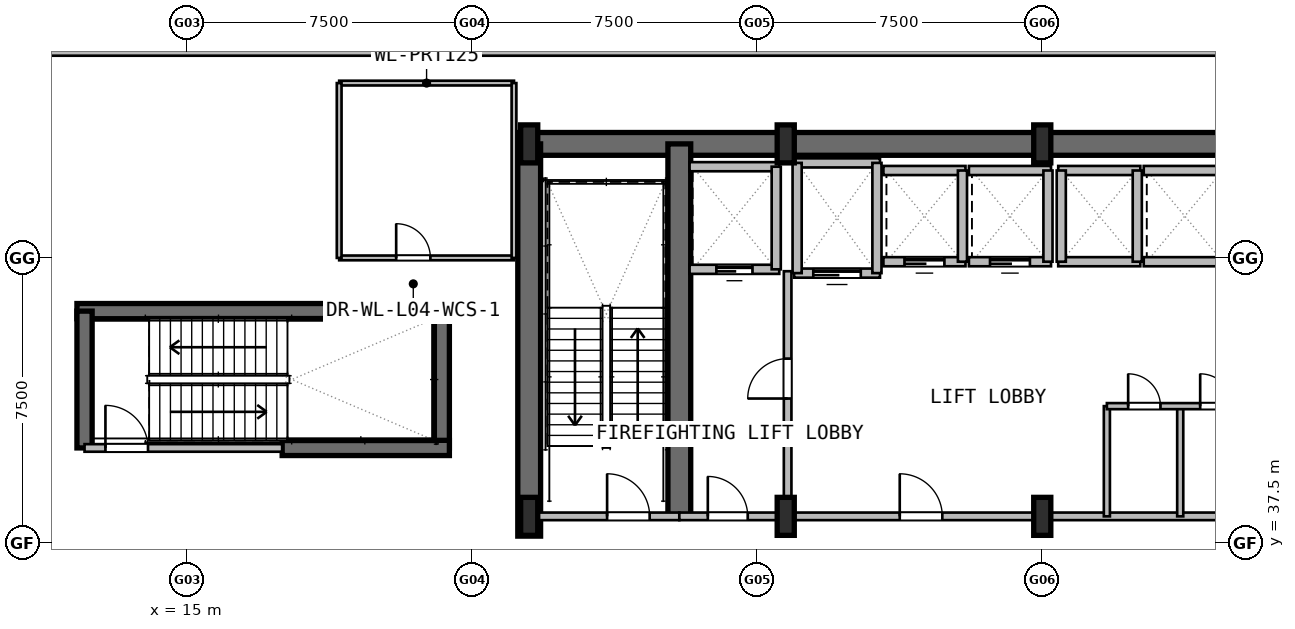
"""IFC4 building model, lengths in metres.
Left out: names, types, materials, properties, quantities, classifications, styles, units other than length and angle.
Written with IfcOpenShell. Run it as: python <this file> out.ifc"""

import sys

from ifc_helpers import new_model, si_unit, direction, frame, frame_2d, origin, origin_2d, place, context, subcontext, project, spatial, rectangle, i_section, extrude, element, fill, save


model = new_model("IFC4")
c1 = context("Model", 3, precision=1e-05, world=origin(), true_north=direction((0.0, 1.0)))
c2 = subcontext(c1, "Body", "Model", "MODEL_VIEW")
j1 = project(units=[si_unit("LENGTHUNIT", "METRE"), si_unit("PLANEANGLEUNIT", "RADIAN")], contexts=[c1])
p1 = place(None, origin())
s1 = spatial("IfcSite", under=j1, at=p1, CompositionType="ELEMENT")
p2 = place(p1, origin())
s2 = spatial("IfcBuilding", under=s1, at=p2, CompositionType="ELEMENT")
p3 = place(p2, frame((0.0, 0.0, 20.4)))
s3 = spatial("IfcBuildingStorey", under=s2, at=p3, CompositionType="ELEMENT", Elevation=20.4)
p4 = place(p3, frame((23.7, 48.0, 0.0), z_axis=(0.0, 0.0, 1.0), x_axis=(1.0, 0.0, 0.0)))
e1 = element("IfcWall", 1, at=p4, inside=s3, PredefinedType="SHEAR", context=c2, shape_type="SweptSolid", body=[
    extrude(rectangle(XDim=27.6, YDim=0.6, at=frame_2d((13.8, 0.0))), origin(), (0.0, 0.0, 1.0), 4.8),
])
p5 = place(p3, frame((24.0, 37.68, 0.0), z_axis=(0.0, 0.0, 1.0), x_axis=(0.0, 1.0, 0.0)))
e2 = element("IfcWall", 2, at=p5, inside=s3, PredefinedType="SHEAR", context=c2, shape_type="SweptSolid", body=[
    extrude(rectangle(XDim=10.32, YDim=0.6, at=frame_2d((5.16, 0.0))), origin(), (0.0, 0.0, 1.0), 4.8),
])
p6 = place(p3, frame((27.95, 38.2, 0.0), z_axis=(0.0, 0.0, 1.0), x_axis=(0.0, 1.0, 0.0)))
e3 = element("IfcWall", 3, at=p6, inside=s3, PredefinedType="SHEAR", context=c2, shape_type="SweptSolid", body=[
    extrude(rectangle(XDim=9.8, YDim=0.6, at=frame_2d((4.9, 0.0))), origin(), (0.0, 0.0, 1.0), 4.8),
])
for number, where, z_axis, x_axis in (
    (4, (24.0, 38.2, 0.0), (0.0, 0.0, 1.0), (1.0, 0.0, 0.0)),
    (5, (24.0, 48.0, 0.0), (0.0, 0.0, 1.0), (1.0, 0.0, 0.0)),
    (6, (30.75, 38.2, 0.0), (0.0, 0.0, 1.0), (1.0, 0.0, 0.0)),
    (7, (30.75, 48.0, 0.0), (0.0, 0.0, 1.0), (1.0, 0.0, 0.0)),
    (8, (37.5, 38.2, 0.0), (0.0, 0.0, 1.0), (1.0, 0.0, 0.0)),
    (9, (37.5, 48.0, 0.0), (0.0, 0.0, 1.0), (1.0, 0.0, 0.0)),
):
    element("IfcColumn", number, at=place(p3, frame(where, z_axis=z_axis, x_axis=x_axis)), inside=s3, PredefinedType="COLUMN", context=c2, shape_type="SweptSolid", body=[
        extrude(i_section(OverallWidth=0.45, OverallDepth=1.0, WebThickness=0.022, FlangeThickness=0.04, at=origin_2d()), origin(), (0.0, 0.0, 1.0), 4.8),
    ])
p7 = place(p3, frame((12.1, 43.6, 0.0), z_axis=(0.0, 0.0, 1.0), x_axis=(1.0, 0.0, 0.0)))
e10 = element("IfcWall", 10, at=p7, inside=s3, PredefinedType="SHEAR", context=c2, shape_type="SweptSolid", body=[
    extrude(rectangle(XDim=9.8, YDim=0.4, at=frame_2d((4.9, 0.0))), origin(), (0.0, 0.0, 1.0), 4.8),
])
for number, where, z_axis, x_axis in (
    (11, (12.3, 40.0, 0.0), (0.0, 0.0, 1.0), (0.0, 1.0, 0.0)),
    (12, (21.7, 40.0, 0.0), (0.0, 0.0, 1.0), (0.0, 1.0, 0.0)),
):
    element("IfcWall", number, at=place(p3, frame(where, z_axis=z_axis, x_axis=x_axis)), inside=s3, PredefinedType="SHEAR", context=c2, shape_type="SweptSolid", body=[
        extrude(rectangle(XDim=3.6, YDim=0.4, at=frame_2d((1.8, 0.0))), origin(), (0.0, 0.0, 1.0), 4.8),
    ])
p8 = place(p3, frame((17.5, 40.0, 0.0), z_axis=(0.0, 0.0, 1.0), x_axis=(1.0, 0.0, 0.0)))
e13 = element("IfcWall", 13, at=p8, inside=s3, PredefinedType="SHEAR", context=c2, shape_type="SweptSolid", body=[
    extrude(rectangle(XDim=4.4, YDim=0.4, at=frame_2d((2.2, 0.0))), origin(), (0.0, 0.0, 1.0), 4.8),
])
p9 = place(p3, frame((7.32, 50.5, 0.0), z_axis=(0.0, 0.0, 1.0), x_axis=(1.0, 0.0, 0.0)))
e14 = element("IfcWall", 14, at=p9, inside=s3, PredefinedType="SOLIDWALL", context=c2, shape_type="SweptSolid", body=[
    extrude(rectangle(XDim=88.53, YDim=0.36, at=frame_2d((44.265, 0.0))), origin(), (0.0, 0.0, 1.0), 4.43),
])
p10 = place(p3, frame((24.0, 38.2, 0.0), z_axis=(0.0, 0.0, 1.0), x_axis=(1.0, 0.0, 0.0)))
e15 = element("IfcWall", 15, at=p10, inside=s3, PredefinedType="PARTITIONING", context=c2, shape_type="SweptSolid", body=[
    extrude(rectangle(XDim=3.95, YDim=0.2, at=frame_2d((1.975, 0.0))), origin(), (0.0, 0.0, 1.0), 3.63),
])
p11 = place(p10, frame((2.05, 0.0, 0.0)))
e16 = element("IfcOpeningElement", 16, at=p11, cuts=e15, PredefinedType="OPENING", context=c2, shape_type="SweptSolid", body=[
    extrude(rectangle(XDim=1.12, YDim=2.1, at=frame_2d((0.56, 1.05))), frame((0.0, 0.11, 0.0), z_axis=(0.0, -1.0, 0.0), x_axis=(1.0, 0.0, 0.0)), (0.0, 0.0, 1.0), 0.22),
])
p12 = place(p3, frame((30.8, 38.2, 0.0), z_axis=(0.0, 0.0, 1.0), x_axis=(0.0, 1.0, 0.0)))
e17 = element("IfcWall", 17, at=p12, inside=s3, PredefinedType="PARTITIONING", context=c2, shape_type="SweptSolid", body=[
    extrude(rectangle(XDim=6.45, YDim=0.2, at=frame_2d((3.225, 0.0))), origin(), (0.0, 0.0, 1.0), 3.63),
])
p13 = place(p12, frame((3.1, 0.0, 0.0)))
e18 = element("IfcOpeningElement", 18, at=p13, cuts=e17, PredefinedType="OPENING", context=c2, shape_type="SweptSolid", body=[
    extrude(rectangle(XDim=1.05, YDim=2.1, at=frame_2d((0.525, 1.05))), frame((0.0, 0.11, 0.0), z_axis=(0.0, -1.0, 0.0), x_axis=(1.0, 0.0, 0.0)), (0.0, 0.0, 1.0), 0.22),
])
p14 = place(p3, frame((27.95, 38.2, 0.0), z_axis=(0.0, 0.0, 1.0), x_axis=(1.0, 0.0, 0.0)))
e19 = element("IfcWall", 19, at=p14, inside=s3, PredefinedType="PARTITIONING", context=c2, shape_type="SweptSolid", body=[
    extrude(rectangle(XDim=2.85, YDim=0.2, at=frame_2d((1.425, 0.0))), origin(), (0.0, 0.0, 1.0), 3.63),
])
p15 = place(p14, frame((0.75, 0.0, 0.0)))
e20 = element("IfcOpeningElement", 20, at=p15, cuts=e19, PredefinedType="OPENING", context=c2, shape_type="SweptSolid", body=[
    extrude(rectangle(XDim=1.05, YDim=2.1, at=frame_2d((0.525, 1.05))), frame((0.0, 0.11, 0.0), z_axis=(0.0, -1.0, 0.0), x_axis=(1.0, 0.0, 0.0)), (0.0, 0.0, 1.0), 0.22),
])
p16 = place(p3, frame((30.8, 38.2, 0.0), z_axis=(0.0, 0.0, 1.0), x_axis=(1.0, 0.0, 0.0)))
e21 = element("IfcWall", 21, at=p16, inside=s3, PredefinedType="PARTITIONING", context=c2, shape_type="SweptSolid", body=[
    extrude(rectangle(XDim=16.35, YDim=0.2, at=frame_2d((8.175, 0.0))), origin(), (0.0, 0.0, 1.0), 3.63),
])
p17 = place(p16, frame((2.95, 0.0, 0.0)))
e22 = element("IfcOpeningElement", 22, at=p17, cuts=e21, PredefinedType="OPENING", context=c2, shape_type="SweptSolid", body=[
    extrude(rectangle(XDim=1.12, YDim=2.1, at=frame_2d((0.56, 1.05))), frame((0.0, 0.11, 0.0), z_axis=(0.0, -1.0, 0.0), x_axis=(1.0, 0.0, 0.0)), (0.0, 0.0, 1.0), 0.22),
])
p18 = place(p3, frame((28.22, 44.7, 0.0), z_axis=(0.0, 0.0, 1.0), x_axis=(1.0, 0.0, 0.0)))
e23 = element("IfcWall", 23, at=p18, inside=s3, PredefinedType="PARTITIONING", context=c2, shape_type="SweptSolid", body=[
    extrude(rectangle(XDim=2.36, YDim=0.24, at=frame_2d((1.18, 0.0))), origin(), (0.0, 0.0, 1.0), 4.43),
])
p19 = place(p18, frame((0.705, 0.0, 0.0)))
e24 = element("IfcOpeningElement", 24, at=p19, cuts=e23, PredefinedType="OPENING", context=c2, shape_type="SweptSolid", body=[
    extrude(rectangle(XDim=0.95, YDim=2.15, at=frame_2d((0.475, 1.075))), frame((0.0, 0.13, 0.0), z_axis=(0.0, -1.0, 0.0), x_axis=(1.0, 0.0, 0.0)), (0.0, 0.0, 1.0), 0.26),
])
p20 = place(p3, frame((28.22, 47.4, 0.0), z_axis=(0.0, 0.0, 1.0), x_axis=(1.0, 0.0, 0.0)))
e25 = element("IfcWall", 25, at=p20, inside=s3, PredefinedType="PARTITIONING", context=c2, shape_type="SweptSolid", body=[
    extrude(rectangle(XDim=2.36, YDim=0.24, at=frame_2d((1.18, 0.0))), origin(), (0.0, 0.0, 1.0), 4.43),
])
p21 = place(p3, frame((30.5, 44.7, 0.0), z_axis=(0.0, 0.0, 1.0), x_axis=(0.0, 1.0, 0.0)))
e26 = element("IfcWall", 26, at=p21, inside=s3, PredefinedType="PARTITIONING", context=c2, shape_type="SweptSolid", body=[
    extrude(rectangle(XDim=2.7, YDim=0.24, at=frame_2d((1.35, 0.0))), origin(), (0.0, 0.0, 1.0), 3.63),
])
p22 = place(p3, frame((30.97, 44.6, 0.0), z_axis=(0.0, 0.0, 1.0), x_axis=(1.0, 0.0, 0.0)))
e27 = element("IfcWall", 27, at=p22, inside=s3, PredefinedType="PARTITIONING", context=c2, shape_type="SweptSolid", body=[
    extrude(rectangle(XDim=2.26, YDim=0.24, at=frame_2d((1.13, 0.0))), origin(), (0.0, 0.0, 1.0), 4.43),
])
p23 = place(p22, frame((0.505, 0.0, 0.0)))
e28 = element("IfcOpeningElement", 28, at=p23, cuts=e27, PredefinedType="OPENING", context=c2, shape_type="SweptSolid", body=[
    extrude(rectangle(XDim=1.25, YDim=2.2, at=frame_2d((0.625, 1.1))), frame((0.0, 0.13, 0.0), z_axis=(0.0, -1.0, 0.0), x_axis=(1.0, 0.0, 0.0)), (0.0, 0.0, 1.0), 0.26),
])
p24 = place(p3, frame((30.97, 47.5, 0.0), z_axis=(0.0, 0.0, 1.0), x_axis=(1.0, 0.0, 0.0)))
e29 = element("IfcWall", 29, at=p24, inside=s3, PredefinedType="PARTITIONING", context=c2, shape_type="SweptSolid", body=[
    extrude(rectangle(XDim=2.26, YDim=0.24, at=frame_2d((1.13, 0.0))), origin(), (0.0, 0.0, 1.0), 4.43),
])
p25 = place(p3, frame((31.05, 44.6, 0.0), z_axis=(0.0, 0.0, 1.0), x_axis=(0.0, 1.0, 0.0)))
e30 = element("IfcWall", 30, at=p25, inside=s3, PredefinedType="PARTITIONING", context=c2, shape_type="SweptSolid", body=[
    extrude(rectangle(XDim=2.9, YDim=0.24, at=frame_2d((1.45, 0.0))), origin(), (0.0, 0.0, 1.0), 3.63),
])
p26 = place(p3, frame((33.15, 44.6, 0.0), z_axis=(0.0, 0.0, 1.0), x_axis=(0.0, 1.0, 0.0)))
e31 = element("IfcWall", 31, at=p26, inside=s3, PredefinedType="PARTITIONING", context=c2, shape_type="SweptSolid", body=[
    extrude(rectangle(XDim=2.9, YDim=0.24, at=frame_2d((1.45, 0.0))), origin(), (0.0, 0.0, 1.0), 4.43),
])
p27 = place(p3, frame((33.32, 44.9, 0.0), z_axis=(0.0, 0.0, 1.0), x_axis=(1.0, 0.0, 0.0)))
e32 = element("IfcWall", 32, at=p27, inside=s3, PredefinedType="PARTITIONING", context=c2, shape_type="SweptSolid", body=[
    extrude(rectangle(XDim=2.16, YDim=0.24, at=frame_2d((1.08, 0.0))), origin(), (0.0, 0.0, 1.0), 4.43),
])
p28 = place(p27, frame((0.555, 0.0, 0.0)))
e33 = element("IfcOpeningElement", 33, at=p28, cuts=e32, PredefinedType="OPENING", context=c2, shape_type="SweptSolid", body=[
    extrude(rectangle(XDim=1.05, YDim=2.15, at=frame_2d((0.525, 1.075))), frame((0.0, 0.13, 0.0), z_axis=(0.0, -1.0, 0.0), x_axis=(1.0, 0.0, 0.0)), (0.0, 0.0, 1.0), 0.26),
])
p29 = place(p3, frame((33.32, 47.3, 0.0), z_axis=(0.0, 0.0, 1.0), x_axis=(1.0, 0.0, 0.0)))
e34 = element("IfcWall", 34, at=p29, inside=s3, PredefinedType="PARTITIONING", context=c2, shape_type="SweptSolid", body=[
    extrude(rectangle(XDim=2.16, YDim=0.24, at=frame_2d((1.08, 0.0))), origin(), (0.0, 0.0, 1.0), 4.43),
])
p30 = place(p3, frame((35.4, 44.9, 0.0), z_axis=(0.0, 0.0, 1.0), x_axis=(0.0, 1.0, 0.0)))
e35 = element("IfcWall", 35, at=p30, inside=s3, PredefinedType="PARTITIONING", context=c2, shape_type="SweptSolid", body=[
    extrude(rectangle(XDim=2.4, YDim=0.24, at=frame_2d((1.2, 0.0))), origin(), (0.0, 0.0, 1.0), 4.43),
])
p31 = place(p3, frame((35.57, 44.9, 0.0), z_axis=(0.0, 0.0, 1.0), x_axis=(1.0, 0.0, 0.0)))
e36 = element("IfcWall", 36, at=p31, inside=s3, PredefinedType="PARTITIONING", context=c2, shape_type="SweptSolid", body=[
    extrude(rectangle(XDim=2.16, YDim=0.24, at=frame_2d((1.08, 0.0))), origin(), (0.0, 0.0, 1.0), 4.43),
])
p32 = place(p31, frame((0.555, 0.0, 0.0)))
e37 = element("IfcOpeningElement", 37, at=p32, cuts=e36, PredefinedType="OPENING", context=c2, shape_type="SweptSolid", body=[
    extrude(rectangle(XDim=1.05, YDim=2.15, at=frame_2d((0.525, 1.075))), frame((0.0, 0.13, 0.0), z_axis=(0.0, -1.0, 0.0), x_axis=(1.0, 0.0, 0.0)), (0.0, 0.0, 1.0), 0.26),
])
p33 = place(p3, frame((35.57, 47.3, 0.0), z_axis=(0.0, 0.0, 1.0), x_axis=(1.0, 0.0, 0.0)))
e38 = element("IfcWall", 38, at=p33, inside=s3, PredefinedType="PARTITIONING", context=c2, shape_type="SweptSolid", body=[
    extrude(rectangle(XDim=2.16, YDim=0.24, at=frame_2d((1.08, 0.0))), origin(), (0.0, 0.0, 1.0), 4.43),
])
p34 = place(p3, frame((37.65, 44.9, 0.0), z_axis=(0.0, 0.0, 1.0), x_axis=(0.0, 1.0, 0.0)))
e39 = element("IfcWall", 39, at=p34, inside=s3, PredefinedType="PARTITIONING", context=c2, shape_type="SweptSolid", body=[
    extrude(rectangle(XDim=2.4, YDim=0.24, at=frame_2d((1.2, 0.0))), origin(), (0.0, 0.0, 1.0), 4.43),
])
for number, where, z_axis, x_axis in (
    (40, (37.92, 44.9, 0.0), (0.0, 0.0, 1.0), (1.0, 0.0, 0.0)),
    (41, (37.92, 47.3, 0.0), (0.0, 0.0, 1.0), (1.0, 0.0, 0.0)),
):
    element("IfcWall", number, at=place(p3, frame(where, z_axis=z_axis, x_axis=x_axis)), inside=s3, PredefinedType="PARTITIONING", context=c2, shape_type="SweptSolid", body=[
        extrude(rectangle(XDim=2.16, YDim=0.24, at=frame_2d((1.08, 0.0))), origin(), (0.0, 0.0, 1.0), 4.43),
    ])
for number, where, z_axis, x_axis in (
    (42, (38.0, 44.9, 0.0), (0.0, 0.0, 1.0), (0.0, 1.0, 0.0)),
    (43, (40.0, 44.9, 0.0), (0.0, 0.0, 1.0), (0.0, 1.0, 0.0)),
):
    element("IfcWall", number, at=place(p3, frame(where, z_axis=z_axis, x_axis=x_axis)), inside=s3, PredefinedType="PARTITIONING", context=c2, shape_type="SweptSolid", body=[
        extrude(rectangle(XDim=2.4, YDim=0.24, at=frame_2d((1.2, 0.0))), origin(), (0.0, 0.0, 1.0), 4.43),
    ])
for number, where, z_axis, x_axis in (
    (44, (40.17, 44.9, 0.0), (0.0, 0.0, 1.0), (1.0, 0.0, 0.0)),
    (45, (40.17, 47.3, 0.0), (0.0, 0.0, 1.0), (1.0, 0.0, 0.0)),
):
    element("IfcWall", number, at=place(p3, frame(where, z_axis=z_axis, x_axis=x_axis)), inside=s3, PredefinedType="PARTITIONING", context=c2, shape_type="SweptSolid", body=[
        extrude(rectangle(XDim=2.16, YDim=0.24, at=frame_2d((1.08, 0.0))), origin(), (0.0, 0.0, 1.0), 4.43),
    ])
p35 = place(p3, frame((12.3, 40.0, 0.0), z_axis=(0.0, 0.0, 1.0), x_axis=(1.0, 0.0, 0.0)))
e46 = element("IfcWall", 46, at=p35, inside=s3, PredefinedType="PARTITIONING", context=c2, shape_type="SweptSolid", body=[
    extrude(rectangle(XDim=5.2, YDim=0.2, at=frame_2d((2.6, 0.0))), origin(), (0.0, 0.0, 1.0), 4.43),
])
p36 = place(p35, frame((0.55, 0.0, 0.0)))
e47 = element("IfcOpeningElement", 47, at=p36, cuts=e46, PredefinedType="OPENING", context=c2, shape_type="SweptSolid", body=[
    extrude(rectangle(XDim=1.12, YDim=2.1, at=frame_2d((0.56, 1.05))), frame((0.0, 0.11, 0.0), z_axis=(0.0, -1.0, 0.0), x_axis=(1.0, 0.0, 0.0)), (0.0, 0.0, 1.0), 0.22),
])
p37 = place(p3, frame((19.0, 45.0, 0.0), z_axis=(0.0, 0.0, 1.0), x_axis=(1.0, 0.0, 0.0)))
e48 = element("IfcWall", 48, at=p37, inside=s3, PredefinedType="PARTITIONING", context=c2, shape_type="SweptSolid", body=[
    extrude(rectangle(XDim=4.6, YDim=0.125, at=frame_2d((2.3, 0.0))), origin(), (0.0, 0.0, 1.0), 4.43),
])
p38 = place(p37, frame((1.5, 0.0, 0.0)))
e49 = element("IfcOpeningElement", 49, at=p38, cuts=e48, PredefinedType="OPENING", context=c2, shape_type="SweptSolid", body=[
    extrude(rectangle(XDim=0.9, YDim=2.05, at=frame_2d((0.45, 1.025))), frame((0.0, 0.073, 0.0), z_axis=(0.0, -1.0, 0.0), x_axis=(1.0, 0.0, 0.0)), (0.0, 0.0, 1.0), 0.145),
])
for number, where, z_axis, x_axis in (
    (50, (19.0, 49.6, 0.0), (0.0, 0.0, 1.0), (1.0, 0.0, 0.0)),
    (51, (19.0, 45.0, 0.0), (0.0, 0.0, 1.0), (0.0, 1.0, 0.0)),
    (52, (23.6, 45.0, 0.0), (0.0, 0.0, 1.0), (0.0, 1.0, 0.0)),
):
    element("IfcWall", number, at=place(p3, frame(where, z_axis=z_axis, x_axis=x_axis)), inside=s3, PredefinedType="PARTITIONING", context=c2, shape_type="SweptSolid", body=[
        extrude(rectangle(XDim=4.6, YDim=0.125, at=frame_2d((2.3, 0.0))), origin(), (0.0, 0.0, 1.0), 4.43),
    ])
for number, where, z_axis, x_axis in (
    (53, (39.2, 38.2, 0.0), (0.0, 0.0, 1.0), (0.0, 1.0, 0.0)),
    (54, (41.13, 38.2, 0.0), (0.0, 0.0, 1.0), (0.0, 1.0, 0.0)),
):
    element("IfcWall", number, at=place(p3, frame(where, z_axis=z_axis, x_axis=x_axis)), inside=s3, PredefinedType="PARTITIONING", context=c2, shape_type="SweptSolid", body=[
        extrude(rectangle(XDim=2.9, YDim=0.16, at=frame_2d((1.45, 0.0))), origin(), (0.0, 0.0, 1.0), 4.43),
    ])
p39 = place(p3, frame((39.2, 41.1, 0.0), z_axis=(0.0, 0.0, 1.0), x_axis=(1.0, 0.0, 0.0)))
e55 = element("IfcWall", 55, at=p39, inside=s3, PredefinedType="PARTITIONING", context=c2, shape_type="SweptSolid", body=[
    extrude(rectangle(XDim=7.95, YDim=0.16, at=frame_2d((3.975, 0.0))), origin(), (0.0, 0.0, 1.0), 4.43),
])
p40 = place(p39, frame((0.56, 0.0, 0.0)))
e56 = element("IfcOpeningElement", 56, at=p40, cuts=e55, PredefinedType="OPENING", context=c2, shape_type="SweptSolid", body=[
    extrude(rectangle(XDim=0.85, YDim=2.05, at=frame_2d((0.425, 1.025))), frame((0.0, 0.09, 0.0), z_axis=(0.0, -1.0, 0.0), x_axis=(1.0, 0.0, 0.0)), (0.0, 0.0, 1.0), 0.18),
])
p41 = place(p39, frame((2.455, 0.0, 0.0)))
e57 = element("IfcOpeningElement", 57, at=p41, cuts=e55, PredefinedType="OPENING", context=c2, shape_type="SweptSolid", body=[
    extrude(rectangle(XDim=0.85, YDim=2.05, at=frame_2d((0.425, 1.025))), frame((0.0, 0.09, 0.0), z_axis=(0.0, -1.0, 0.0), x_axis=(1.0, 0.0, 0.0)), (0.0, 0.0, 1.0), 0.18),
])
p42 = place(p39, frame((4.355, 0.0, 0.0)))
e58 = element("IfcOpeningElement", 58, at=p42, cuts=e55, PredefinedType="OPENING", context=c2, shape_type="SweptSolid", body=[
    extrude(rectangle(XDim=0.85, YDim=2.05, at=frame_2d((0.425, 1.025))), frame((0.0, 0.09, 0.0), z_axis=(0.0, -1.0, 0.0), x_axis=(1.0, 0.0, 0.0)), (0.0, 0.0, 1.0), 0.18),
])
p43 = place(p39, frame((6.18, 0.0, 0.0)))
e59 = element("IfcOpeningElement", 59, at=p43, cuts=e55, PredefinedType="OPENING", context=c2, shape_type="SweptSolid", body=[
    extrude(rectangle(XDim=0.85, YDim=2.05, at=frame_2d((0.425, 1.025))), frame((0.0, 0.09, 0.0), z_axis=(0.0, -1.0, 0.0), x_axis=(1.0, 0.0, 0.0)), (0.0, 0.0, 1.0), 0.18),
])
p44 = place(p11, origin())
e60 = element("IfcDoor", 60, at=p44, inside=s3, OperationType="SINGLE_SWING_RIGHT", PredefinedType="DOOR", context=c2, shape_type="SweptSolid", body=[
    extrude(rectangle(XDim=1.12, YDim=2.1, at=frame_2d((0.56, 1.05))), frame((0.0, 0.025, 0.0), z_axis=(0.0, -1.0, 0.0), x_axis=(1.0, 0.0, 0.0)), (0.0, 0.0, 1.0), 0.05),
])
fill(e16, e60)
p45 = place(p13, origin())
e61 = element("IfcDoor", 61, at=p45, inside=s3, OperationType="SINGLE_SWING_RIGHT", PredefinedType="DOOR", context=c2, shape_type="SweptSolid", body=[
    extrude(rectangle(XDim=1.05, YDim=2.1, at=frame_2d((0.525, 1.05))), frame((0.0, 0.025, 0.0), z_axis=(0.0, -1.0, 0.0), x_axis=(1.0, 0.0, 0.0)), (0.0, 0.0, 1.0), 0.05),
])
fill(e18, e61)
p46 = place(p15, origin())
e62 = element("IfcDoor", 62, at=p46, inside=s3, OperationType="SINGLE_SWING_LEFT", PredefinedType="DOOR", context=c2, shape_type="SweptSolid", body=[
    extrude(rectangle(XDim=1.05, YDim=2.1, at=frame_2d((0.525, 1.05))), frame((0.0, 0.025, 0.0), z_axis=(0.0, -1.0, 0.0), x_axis=(1.0, 0.0, 0.0)), (0.0, 0.0, 1.0), 0.05),
])
fill(e20, e62)
p47 = place(p17, origin())
e63 = element("IfcDoor", 63, at=p47, inside=s3, OperationType="SINGLE_SWING_RIGHT", PredefinedType="DOOR", context=c2, shape_type="SweptSolid", body=[
    extrude(rectangle(XDim=1.12, YDim=2.1, at=frame_2d((0.56, 1.05))), frame((0.0, 0.025, 0.0), z_axis=(0.0, -1.0, 0.0), x_axis=(1.0, 0.0, 0.0)), (0.0, 0.0, 1.0), 0.05),
])
fill(e22, e63)
p48 = place(p19, origin())
e64 = element("IfcDoor", 64, at=p48, inside=s3, OperationType="SLIDING_TO_LEFT", PredefinedType="DOOR", context=c2, shape_type="SweptSolid", body=[
    extrude(rectangle(XDim=0.95, YDim=2.15, at=frame_2d((0.475, 1.075))), frame((0.0, 0.025, 0.0), z_axis=(0.0, -1.0, 0.0), x_axis=(1.0, 0.0, 0.0)), (0.0, 0.0, 1.0), 0.05),
])
fill(e24, e64)
p49 = place(p23, origin())
e65 = element("IfcDoor", 65, at=p49, inside=s3, OperationType="SLIDING_TO_LEFT", PredefinedType="DOOR", context=c2, shape_type="SweptSolid", body=[
    extrude(rectangle(XDim=1.25, YDim=2.2, at=frame_2d((0.625, 1.1))), frame((0.0, 0.025, 0.0), z_axis=(0.0, -1.0, 0.0), x_axis=(1.0, 0.0, 0.0)), (0.0, 0.0, 1.0), 0.05),
])
fill(e28, e65)
p50 = place(p28, origin())
e66 = element("IfcDoor", 66, at=p50, inside=s3, OperationType="SLIDING_TO_LEFT", PredefinedType="DOOR", context=c2, shape_type="SweptSolid", body=[
    extrude(rectangle(XDim=1.05, YDim=2.15, at=frame_2d((0.525, 1.075))), frame((0.0, 0.025, 0.0), z_axis=(0.0, -1.0, 0.0), x_axis=(1.0, 0.0, 0.0)), (0.0, 0.0, 1.0), 0.05),
])
fill(e33, e66)
p51 = place(p32, origin())
e67 = element("IfcDoor", 67, at=p51, inside=s3, OperationType="SLIDING_TO_LEFT", PredefinedType="DOOR", context=c2, shape_type="SweptSolid", body=[
    extrude(rectangle(XDim=1.05, YDim=2.15, at=frame_2d((0.525, 1.075))), frame((0.0, 0.025, 0.0), z_axis=(0.0, -1.0, 0.0), x_axis=(1.0, 0.0, 0.0)), (0.0, 0.0, 1.0), 0.05),
])
fill(e37, e67)
p52 = place(p36, origin())
e68 = element("IfcDoor", 68, at=p52, inside=s3, OperationType="SINGLE_SWING_RIGHT", PredefinedType="DOOR", context=c2, shape_type="SweptSolid", body=[
    extrude(rectangle(XDim=1.12, YDim=2.1, at=frame_2d((0.56, 1.05))), frame((0.0, 0.025, 0.0), z_axis=(0.0, -1.0, 0.0), x_axis=(1.0, 0.0, 0.0)), (0.0, 0.0, 1.0), 0.05),
])
fill(e47, e68)
p53 = place(p38, origin())
e69 = element("IfcDoor", 69, at=p53, inside=s3, OperationType="SINGLE_SWING_LEFT", PredefinedType="DOOR", context=c2, shape_type="SweptSolid", body=[
    extrude(rectangle(XDim=0.9, YDim=2.05, at=frame_2d((0.45, 1.025))), frame((0.0, 0.025, 0.0), z_axis=(0.0, -1.0, 0.0), x_axis=(1.0, 0.0, 0.0)), (0.0, 0.0, 1.0), 0.05),
])
fill(e49, e69)
p54 = place(p40, origin())
e70 = element("IfcDoor", 70, at=p54, inside=s3, OperationType="SINGLE_SWING_RIGHT", PredefinedType="DOOR", context=c2, shape_type="SweptSolid", body=[
    extrude(rectangle(XDim=0.85, YDim=2.05, at=frame_2d((0.425, 1.025))), frame((0.0, 0.025, 0.0), z_axis=(0.0, -1.0, 0.0), x_axis=(1.0, 0.0, 0.0)), (0.0, 0.0, 1.0), 0.05),
])
fill(e56, e70)
p55 = place(p41, origin())
e71 = element("IfcDoor", 71, at=p55, inside=s3, OperationType="SINGLE_SWING_LEFT", PredefinedType="DOOR", context=c2, shape_type="SweptSolid", body=[
    extrude(rectangle(XDim=0.85, YDim=2.05, at=frame_2d((0.425, 1.025))), frame((0.0, 0.025, 0.0), z_axis=(0.0, -1.0, 0.0), x_axis=(1.0, 0.0, 0.0)), (0.0, 0.0, 1.0), 0.05),
])
fill(e57, e71)
save(model, sys.argv[1])
